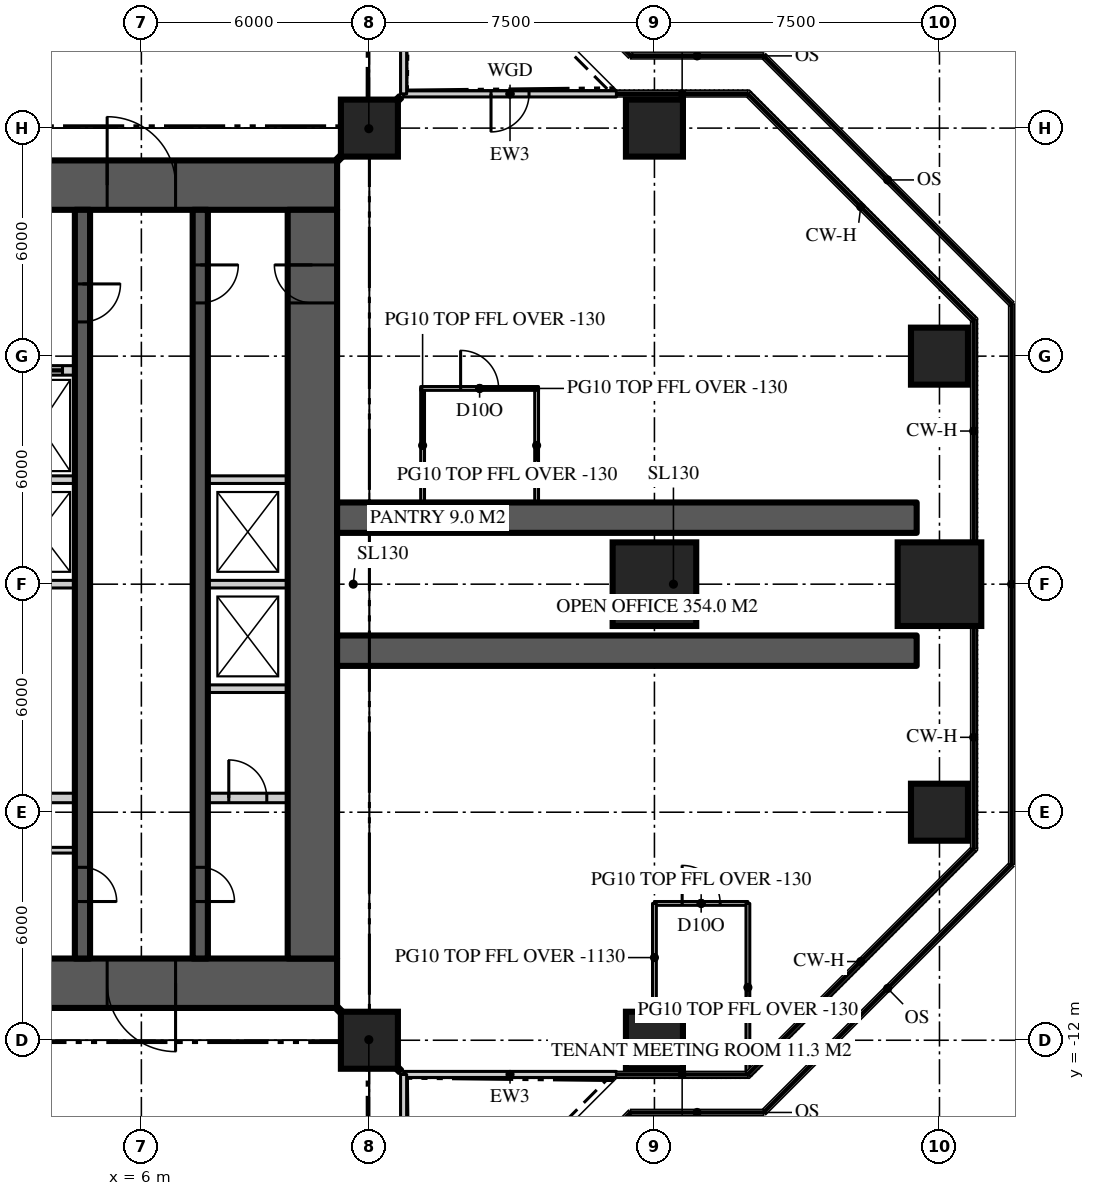
"""IFC4 building model, lengths in metres.
Left out: names, types, materials, properties, quantities, classifications, styles, units other than length and angle.
Written with IfcOpenShell. Run it as: python <this file> out.ifc"""

import sys

from ifc_helpers import new_model, si_unit, direction, frame, frame_2d, origin, origin_2d, place, context, subcontext, project, spatial, rectangle, extrude, element, fill, save


model = new_model("IFC4")
c1 = context("Model", 3, precision=1e-05, world=origin(), true_north=direction((0.0, 1.0)))
c2 = subcontext(c1, "Body", "Model", "MODEL_VIEW")
j1 = project(units=[si_unit("LENGTHUNIT", "METRE"), si_unit("PLANEANGLEUNIT", "RADIAN")], contexts=[c1])
p1 = place(None, origin())
s1 = spatial("IfcSite", under=j1, at=p1, CompositionType="ELEMENT")
p2 = place(p1, origin())
s2 = spatial("IfcBuilding", under=s1, at=p2, CompositionType="ELEMENT")
p3 = place(p2, frame((0.0, 0.0, 259.5)))
s3 = spatial("IfcBuildingStorey", under=s2, at=p3, CompositionType="ELEMENT", Elevation=259.5)
p4 = place(p3, frame((-11.15, 10.5, 0.0), z_axis=(0.0, 0.0, 1.0), x_axis=(1.0, 0.0, 0.0)))
e1 = element("IfcWall", 1, at=p4, inside=s3, PredefinedType="SHEAR", context=c2, shape_type="SweptSolid", body=[
    extrude(rectangle(XDim=22.3, YDim=1.3, at=frame_2d((11.15, 0.0))), origin(), (0.0, 0.0, 1.0), 3.9),
])
p5 = place(p4, frame((4.25, 0.0, 0.0)))
e2 = element("IfcOpeningElement", 2, at=p5, cuts=e1, PredefinedType="OPENING", context=c2, shape_type="SweptSolid", body=[
    extrude(rectangle(XDim=1.8, YDim=2.2, at=frame_2d((0.9, 1.1))), frame((0.0, 0.66, 0.0), z_axis=(0.0, -1.0, 0.0), x_axis=(1.0, 0.0, 0.0)), (0.0, 0.0, 1.0), 1.32),
])
p6 = place(p4, frame((16.25, 0.0, 0.0)))
e3 = element("IfcOpeningElement", 3, at=p6, cuts=e1, PredefinedType="OPENING", context=c2, shape_type="SweptSolid", body=[
    extrude(rectangle(XDim=1.8, YDim=2.2, at=frame_2d((0.9, 1.1))), frame((0.0, 0.66, 0.0), z_axis=(0.0, -1.0, 0.0), x_axis=(1.0, 0.0, 0.0)), (0.0, 0.0, 1.0), 1.32),
])
p7 = place(p3, frame((11.15, -10.5, 0.0), z_axis=(0.0, 0.0, 1.0), x_axis=(-1.0, 0.0, 0.0)))
e4 = element("IfcWall", 4, at=p7, inside=s3, PredefinedType="SHEAR", context=c2, shape_type="SweptSolid", body=[
    extrude(rectangle(XDim=22.3, YDim=1.3, at=frame_2d((11.15, 0.0))), origin(), (0.0, 0.0, 1.0), 3.9),
])
p8 = place(p7, frame((16.25, 0.0, 0.0)))
e5 = element("IfcOpeningElement", 5, at=p8, cuts=e4, PredefinedType="OPENING", context=c2, shape_type="SweptSolid", body=[
    extrude(rectangle(XDim=1.8, YDim=2.2, at=frame_2d((0.9, 1.1))), frame((0.0, 0.66, 0.0), z_axis=(0.0, -1.0, 0.0), x_axis=(1.0, 0.0, 0.0)), (0.0, 0.0, 1.0), 1.32),
])
p9 = place(p7, frame((4.25, 0.0, 0.0)))
e6 = element("IfcOpeningElement", 6, at=p9, cuts=e4, PredefinedType="OPENING", context=c2, shape_type="SweptSolid", body=[
    extrude(rectangle(XDim=1.8, YDim=2.2, at=frame_2d((0.9, 1.1))), frame((0.0, 0.66, 0.0), z_axis=(0.0, -1.0, 0.0), x_axis=(1.0, 0.0, 0.0)), (0.0, 0.0, 1.0), 1.32),
])
p10 = place(p3, frame((10.5, -9.85, 0.0), z_axis=(0.0, 0.0, 1.0), x_axis=(0.0, 1.0, 0.0)))
e7 = element("IfcWall", 7, at=p10, inside=s3, PredefinedType="SHEAR", context=c2, shape_type="SweptSolid", body=[
    extrude(rectangle(XDim=19.7, YDim=1.3, at=frame_2d((9.85, 0.0))), origin(), (0.0, 0.0, 1.0), 3.9),
])
p11 = place(p10, frame((17.25, 0.0, 0.0)))
e8 = element("IfcOpeningElement", 8, at=p11, cuts=e7, PredefinedType="OPENING", context=c2, shape_type="SweptSolid", body=[
    extrude(rectangle(XDim=1.0, YDim=2.2, at=frame_2d((0.5, 1.1))), frame((0.0, 0.66, 0.0), z_axis=(0.0, -1.0, 0.0), x_axis=(1.0, 0.0, 0.0)), (0.0, 0.0, 1.0), 1.32),
])
for number, where, z_axis, x_axis in (
    (9, (11.15, -1.75, 0.0), (0.0, 0.0, 1.0), (1.0, 0.0, 0.0)),
    (10, (11.15, 1.75, 0.0), (0.0, 0.0, 1.0), (1.0, 0.0, 0.0)),
):
    element("IfcWall", number, at=place(p3, frame(where, z_axis=z_axis, x_axis=x_axis)), inside=s3, PredefinedType="SHEAR", context=c2, shape_type="SweptSolid", body=[
        extrude(rectangle(XDim=15.25, YDim=0.8, at=frame_2d((7.625, 0.0))), origin(), (0.0, 0.0, 1.0), 3.9),
    ])
for number, where, z_axis, x_axis in (
    (11, (12.0, -12.0, 0.0), (0.0, 0.0, 1.0), (1.0, 0.0, 0.0)),
    (12, (19.5, -12.0, 0.0), (0.0, 0.0, 1.0), (1.0, 0.0, 0.0)),
    (13, (27.0, -6.0, 0.0), (0.0, 0.0, 1.0), (1.0, 0.0, 0.0)),
):
    element("IfcColumn", number, at=place(p3, frame(where, z_axis=z_axis, x_axis=x_axis)), inside=s3, PredefinedType="COLUMN", context=c2, shape_type="SweptSolid", body=[
        extrude(rectangle(XDim=1.5, YDim=1.5, at=origin_2d()), origin(), (0.0, 0.0, 1.0), 3.9),
    ])
for number, where, z_axis, x_axis in (
    (14, (19.5, 0.0, 0.0), (0.0, 0.0, 1.0), (1.0, 0.0, 0.0)),
    (15, (27.0, 0.0, 0.0), (0.0, 0.0, 1.0), (1.0, 0.0, 0.0)),
):
    element("IfcColumn", number, at=place(p3, frame(where, z_axis=z_axis, x_axis=x_axis)), inside=s3, PredefinedType="COLUMN", context=c2, shape_type="SweptSolid", body=[
        extrude(rectangle(XDim=2.2, YDim=2.2, at=origin_2d()), origin(), (0.0, 0.0, 1.0), 3.9),
    ])
for number, where, z_axis, x_axis in (
    (16, (27.0, 6.0, 0.0), (0.0, 0.0, 1.0), (1.0, 0.0, 0.0)),
    (17, (12.0, 12.0, 0.0), (0.0, 0.0, 1.0), (1.0, 0.0, 0.0)),
    (18, (19.5, 12.0, 0.0), (0.0, 0.0, 1.0), (1.0, 0.0, 0.0)),
):
    element("IfcColumn", number, at=place(p3, frame(where, z_axis=z_axis, x_axis=x_axis)), inside=s3, PredefinedType="COLUMN", context=c2, shape_type="SweptSolid", body=[
        extrude(rectangle(XDim=1.5, YDim=1.5, at=origin_2d()), origin(), (0.0, 0.0, 1.0), 3.9),
    ])
p12 = place(p3, frame((12.9, -12.9, 0.0), z_axis=(0.0, 0.0, 1.0), x_axis=(1.0, 0.0, 0.0)))
e19 = element("IfcWall", 19, at=p12, inside=s3, PredefinedType="SOLIDWALL", context=c2, shape_type="SweptSolid", body=[
    extrude(rectangle(XDim=5.6, YDim=0.16, at=frame_2d((2.8, 0.0))), origin(), (0.0, 0.0, 1.0), 3.77),
])
p13 = place(p3, frame((18.5, 12.9, 0.0), z_axis=(0.0, 0.0, 1.0), x_axis=(-1.0, 0.0, 0.0)))
e20 = element("IfcWall", 20, at=p13, inside=s3, PredefinedType="SOLIDWALL", context=c2, shape_type="SweptSolid", body=[
    extrude(rectangle(XDim=5.6, YDim=0.16, at=frame_2d((2.8, 0.0))), origin(), (0.0, 0.0, 1.0), 3.77),
])
p14 = place(p13, frame((2.3, 0.0, 0.0)))
e21 = element("IfcOpeningElement", 21, at=p14, cuts=e20, PredefinedType="OPENING", context=c2, shape_type="SweptSolid", body=[
    extrude(rectangle(XDim=1.0, YDim=2.2, at=frame_2d((0.5, 1.1))), frame((0.0, 0.09, 0.0), z_axis=(0.0, -1.0, 0.0), x_axis=(1.0, 0.0, 0.0)), (0.0, 0.0, 1.0), 0.18),
])
p15 = place(p3, frame((12.9, 12.9, 0.0), z_axis=(0.0, 0.0, 1.0), x_axis=(0.0, 1.0, 0.0)))
e22 = element("IfcWall", 22, at=p15, inside=s3, PredefinedType="SOLIDWALL", context=c2, shape_type="SweptSolid", body=[
    extrude(rectangle(XDim=5.6, YDim=0.16, at=frame_2d((2.8, 0.0))), origin(), (0.0, 0.0, 1.0), 3.77),
])
p16 = place(p3, frame((12.9, -18.5, 0.0), z_axis=(0.0, 0.0, 1.0), x_axis=(0.0, 1.0, 0.0)))
e23 = element("IfcWall", 23, at=p16, inside=s3, PredefinedType="SOLIDWALL", context=c2, shape_type="SweptSolid", body=[
    extrude(rectangle(XDim=5.6, YDim=0.16, at=frame_2d((2.8, 0.0))), origin(), (0.0, 0.0, 1.0), 3.77),
])
p17 = place(p16, frame((2.3, 0.0, 0.0)))
e24 = element("IfcOpeningElement", 24, at=p17, cuts=e23, PredefinedType="OPENING", context=c2, shape_type="SweptSolid", body=[
    extrude(rectangle(XDim=1.0, YDim=2.2, at=frame_2d((0.5, 1.1))), frame((0.0, 0.09, 0.0), z_axis=(0.0, -1.0, 0.0), x_axis=(1.0, 0.0, 0.0)), (0.0, 0.0, 1.0), 0.18),
])
p18 = place(p3, frame((7.55, 9.85, 0.0), z_axis=(0.0, 0.0, 1.0), x_axis=(0.0, -1.0, 0.0)))
e25 = element("IfcWall", 25, at=p18, inside=s3, PredefinedType="SHEAR", context=c2, shape_type="SweptSolid", body=[
    extrude(rectangle(XDim=19.7, YDim=0.4, at=frame_2d((9.85, 0.0))), origin(), (0.0, 0.0, 1.0), 3.9),
])
p19 = place(p18, frame((1.45, 0.0, 0.0)))
e26 = element("IfcOpeningElement", 26, at=p19, cuts=e25, PredefinedType="OPENING", context=c2, shape_type="SweptSolid", body=[
    extrude(rectangle(XDim=1.0, YDim=2.2, at=frame_2d((0.5, 1.1))), frame((0.0, 0.21, 0.0), z_axis=(0.0, -1.0, 0.0), x_axis=(1.0, 0.0, 0.0)), (0.0, 0.0, 1.0), 0.42),
])
p20 = place(p18, frame((17.3, 0.0, 0.0)))
e27 = element("IfcOpeningElement", 27, at=p20, cuts=e25, PredefinedType="OPENING", context=c2, shape_type="SweptSolid", body=[
    extrude(rectangle(XDim=0.9, YDim=2.1, at=frame_2d((0.45, 1.05))), frame((0.0, 0.21, 0.0), z_axis=(0.0, -1.0, 0.0), x_axis=(1.0, 0.0, 0.0)), (0.0, 0.0, 1.0), 0.42),
])
p21 = place(p3, frame((4.45, 9.85, 0.0), z_axis=(0.0, 0.0, 1.0), x_axis=(0.0, -1.0, 0.0)))
e28 = element("IfcWall", 28, at=p21, inside=s3, PredefinedType="SHEAR", context=c2, shape_type="SweptSolid", body=[
    extrude(rectangle(XDim=19.7, YDim=0.4, at=frame_2d((9.85, 0.0))), origin(), (0.0, 0.0, 1.0), 3.9),
])
p22 = place(p21, frame((1.95, 0.0, 0.0)))
e29 = element("IfcOpeningElement", 29, at=p22, cuts=e28, PredefinedType="OPENING", context=c2, shape_type="SweptSolid", body=[
    extrude(rectangle(XDim=1.0, YDim=2.2, at=frame_2d((0.5, 1.1))), frame((0.0, 0.21, 0.0), z_axis=(0.0, -1.0, 0.0), x_axis=(1.0, 0.0, 0.0)), (0.0, 0.0, 1.0), 0.42),
])
p23 = place(p21, frame((17.3, 0.0, 0.0)))
e30 = element("IfcOpeningElement", 30, at=p23, cuts=e28, PredefinedType="OPENING", context=c2, shape_type="SweptSolid", body=[
    extrude(rectangle(XDim=0.9, YDim=2.1, at=frame_2d((0.45, 1.05))), frame((0.0, 0.21, 0.0), z_axis=(0.0, -1.0, 0.0), x_axis=(1.0, 0.0, 0.0)), (0.0, 0.0, 1.0), 0.42),
])
p24 = place(p3, frame((2.4, 5.625, 0.0), z_axis=(0.0, 0.0, 1.0), x_axis=(1.0, 0.0, 0.0)))
e31 = element("IfcWall", 31, at=p24, inside=s3, PredefinedType="SOLIDWALL", context=c2, shape_type="SweptSolid", body=[
    extrude(rectangle(XDim=1.85, YDim=0.25, at=frame_2d((0.925, 0.0))), origin(), (0.0, 0.0, 1.0), 3.7),
])
p25 = place(p24, frame((0.325, 0.0, 0.0)))
e32 = element("IfcOpeningElement", 32, at=p25, cuts=e31, PredefinedType="OPENING", context=c2, shape_type="SweptSolid", body=[
    extrude(rectangle(XDim=1.2, YDim=2.2, at=frame_2d((0.6, 1.1))), frame((0.0, 0.135, 0.0), z_axis=(0.0, -1.0, 0.0), x_axis=(1.0, 0.0, 0.0)), (0.0, 0.0, 1.0), 0.27),
])
p26 = place(p3, frame((2.4, -5.625, 0.0), z_axis=(0.0, 0.0, 1.0), x_axis=(1.0, 0.0, 0.0)))
e33 = element("IfcWall", 33, at=p26, inside=s3, PredefinedType="SOLIDWALL", context=c2, shape_type="SweptSolid", body=[
    extrude(rectangle(XDim=1.85, YDim=0.25, at=frame_2d((0.925, 0.0))), origin(), (0.0, 0.0, 1.0), 3.7),
])
p27 = place(p3, frame((7.75, -5.625, 0.0), z_axis=(0.0, 0.0, 1.0), x_axis=(1.0, 0.0, 0.0)))
e34 = element("IfcWall", 34, at=p27, inside=s3, PredefinedType="SOLIDWALL", context=c2, shape_type="SweptSolid", body=[
    extrude(rectangle(XDim=2.1, YDim=0.25, at=frame_2d((1.05, 0.0))), origin(), (0.0, 0.0, 1.0), 3.7),
])
p28 = place(p27, frame((0.55, 0.0, 0.0)))
e35 = element("IfcOpeningElement", 35, at=p28, cuts=e34, PredefinedType="OPENING", context=c2, shape_type="SweptSolid", body=[
    extrude(rectangle(XDim=1.0, YDim=2.2, at=frame_2d((0.5, 1.1))), frame((0.0, 0.135, 0.0), z_axis=(0.0, -1.0, 0.0), x_axis=(1.0, 0.0, 0.0)), (0.0, 0.0, 1.0), 0.27),
])
p29 = place(p3, frame((7.75, -2.75, 0.0), z_axis=(0.0, 0.0, 1.0), x_axis=(1.0, 0.0, 0.0)))
e36 = element("IfcWall", 36, at=p29, inside=s3, PredefinedType="SOLIDWALL", context=c2, shape_type="SweptSolid", body=[
    extrude(rectangle(XDim=2.1, YDim=0.2, at=frame_2d((1.05, 0.0))), origin(), (0.0, 0.0, 1.0), 3.7),
])
p30 = place(p3, frame((2.4, 0.0, 0.0), z_axis=(0.0, 0.0, 1.0), x_axis=(1.0, 0.0, 0.0)))
e37 = element("IfcWall", 37, at=p30, inside=s3, PredefinedType="SOLIDWALL", context=c2, shape_type="SweptSolid", body=[
    extrude(rectangle(XDim=1.85, YDim=0.2, at=frame_2d((0.925, 0.0))), origin(), (0.0, 0.0, 1.0), 3.7),
])
p31 = place(p3, frame((7.75, 0.0, 0.0), z_axis=(0.0, 0.0, 1.0), x_axis=(1.0, 0.0, 0.0)))
e38 = element("IfcWall", 38, at=p31, inside=s3, PredefinedType="SOLIDWALL", context=c2, shape_type="SweptSolid", body=[
    extrude(rectangle(XDim=2.1, YDim=0.2, at=frame_2d((1.05, 0.0))), origin(), (0.0, 0.0, 1.0), 3.7),
])
p32 = place(p3, frame((2.4, 2.75, 0.0), z_axis=(0.0, 0.0, 1.0), x_axis=(1.0, 0.0, 0.0)))
e39 = element("IfcWall", 39, at=p32, inside=s3, PredefinedType="SOLIDWALL", context=c2, shape_type="SweptSolid", body=[
    extrude(rectangle(XDim=1.85, YDim=0.2, at=frame_2d((0.925, 0.0))), origin(), (0.0, 0.0, 1.0), 3.7),
])
p33 = place(p3, frame((7.75, 2.75, 0.0), z_axis=(0.0, 0.0, 1.0), x_axis=(1.0, 0.0, 0.0)))
e40 = element("IfcWall", 40, at=p33, inside=s3, PredefinedType="SOLIDWALL", context=c2, shape_type="SweptSolid", body=[
    extrude(rectangle(XDim=2.1, YDim=0.2, at=frame_2d((1.05, 0.0))), origin(), (0.0, 0.0, 1.0), 3.7),
])
p34 = place(p3, frame((19.5, -8.4, 0.0), z_axis=(0.0, 0.0, 1.0), x_axis=(1.0, 0.0, 0.0)))
e41 = element("IfcWall", 41, at=p34, inside=s3, PredefinedType="PARTITIONING", context=c2, shape_type="SweptSolid", body=[
    extrude(rectangle(XDim=2.459, YDim=0.1, at=frame_2d((1.229, 0.0))), origin(), (0.0, 0.0, 1.0), 3.77),
])
p35 = place(p34, frame((0.729, 0.0, 0.0)))
e42 = element("IfcOpeningElement", 42, at=p35, cuts=e41, PredefinedType="OPENING", context=c2, shape_type="SweptSolid", body=[
    extrude(rectangle(XDim=1.0, YDim=2.2, at=frame_2d((0.5, 1.1))), frame((0.0, 0.06, 0.0), z_axis=(0.0, -1.0, 0.0), x_axis=(1.0, 0.0, 0.0)), (0.0, 0.0, 1.0), 0.12),
])
p36 = place(p3, frame((19.5, -8.4, 0.0), z_axis=(0.0, 0.0, 1.0), x_axis=(0.0, -1.0, 0.0)))
e43 = element("IfcWall", 43, at=p36, inside=s3, PredefinedType="PARTITIONING", context=c2, shape_type="SweptSolid", body=[
    extrude(rectangle(XDim=2.85, YDim=0.1, at=frame_2d((1.425, 0.0))), origin(), (0.0, 0.0, 1.0), 2.77),
])
p37 = place(p3, frame((21.959, -8.4, 0.0), z_axis=(0.0, 0.0, 1.0), x_axis=(0.0, -1.0, 0.0)))
e44 = element("IfcWall", 44, at=p37, inside=s3, PredefinedType="PARTITIONING", context=c2, shape_type="SweptSolid", body=[
    extrude(rectangle(XDim=4.42, YDim=0.1, at=frame_2d((2.21, 0.0))), origin(), (0.0, 0.0, 1.0), 3.77),
])
for number, where, z_axis, x_axis in (
    (45, (13.4, 2.15, 0.0), (0.0, 0.0, 1.0), (0.0, 1.0, 0.0)),
    (46, (16.4, 2.15, 0.0), (0.0, 0.0, 1.0), (0.0, 1.0, 0.0)),
):
    element("IfcWall", number, at=place(p3, frame(where, z_axis=z_axis, x_axis=x_axis)), inside=s3, PredefinedType="PARTITIONING", context=c2, shape_type="SweptSolid", body=[
        extrude(rectangle(XDim=3.0, YDim=0.1, at=frame_2d((1.5, 0.0))), origin(), (0.0, 0.0, 1.0), 3.77),
    ])
p38 = place(p3, frame((13.35, 5.15, 0.0), z_axis=(0.0, 0.0, 1.0), x_axis=(1.0, 0.0, 0.0)))
e47 = element("IfcWall", 47, at=p38, inside=s3, PredefinedType="PARTITIONING", context=c2, shape_type="SweptSolid", body=[
    extrude(rectangle(XDim=3.1, YDim=0.1, at=frame_2d((1.55, 0.0))), origin(), (0.0, 0.0, 1.0), 3.77),
])
p39 = place(p38, frame((1.05, 0.0, 0.0)))
e48 = element("IfcOpeningElement", 48, at=p39, cuts=e47, PredefinedType="OPENING", context=c2, shape_type="SweptSolid", body=[
    extrude(rectangle(XDim=1.0, YDim=2.2, at=frame_2d((0.5, 1.1))), frame((0.0, 0.06, 0.0), z_axis=(0.0, -1.0, 0.0), x_axis=(1.0, 0.0, 0.0)), (0.0, 0.0, 1.0), 0.12),
])
for number, where, z_axis, x_axis in (
    (49, (11.15, 11.15, 0.0), (0.0, 0.0, 1.0), (0.707, 0.707, 0.0)),
    (50, (11.15, -11.15, 0.0), (0.0, 0.0, 1.0), (0.707, -0.707, 0.0)),
):
    element("IfcWall", number, at=place(p3, frame(where, z_axis=z_axis, x_axis=x_axis)), inside=s3, PredefinedType="PARTITIONING", context=c2, shape_type="SweptSolid", body=[
        extrude(rectangle(XDim=2.362, YDim=0.15, at=frame_2d((1.181, 0.0))), origin(), (0.0, 0.0, 1.0), 3.22),
    ])
p40 = place(p3, frame((2.4, -7.0, 0.0), z_axis=(0.0, 0.0, 1.0), x_axis=(1.0, 0.0, 0.0)))
e51 = element("IfcWall", 51, at=p40, inside=s3, PredefinedType="SOLIDWALL", context=c2, shape_type="SweptSolid", body=[
    extrude(rectangle(XDim=1.85, YDim=0.15, at=frame_2d((0.925, 0.0))), origin(), (0.0, 0.0, 1.0), 3.77),
])
p41 = place(p40, frame((0.1, 0.0, 0.0)))
e52 = element("IfcOpeningElement", 52, at=p41, cuts=e51, PredefinedType="OPENING", context=c2, shape_type="SweptSolid", body=[
    extrude(rectangle(XDim=0.9, YDim=2.1, at=frame_2d((0.45, 1.05))), frame((0.0, 0.085, 0.0), z_axis=(0.0, -1.0, 0.0), x_axis=(1.0, 0.0, 0.0)), (0.0, 0.0, 1.0), 0.17),
])
p42 = place(p14, origin())
e53 = element("IfcDoor", 53, at=p42, inside=s3, OperationType="SINGLE_SWING_RIGHT", PredefinedType="DOOR", context=c2, shape_type="SweptSolid", body=[
    extrude(rectangle(XDim=1.0, YDim=2.2, at=frame_2d((0.5, 1.1))), frame((0.0, 0.025, 0.0), z_axis=(0.0, -1.0, 0.0), x_axis=(1.0, 0.0, 0.0)), (0.0, 0.0, 1.0), 0.05),
])
fill(e21, e53)
p43 = place(p6, origin())
e54 = element("IfcDoor", 54, at=p43, inside=s3, OperationType="DOUBLE_DOOR_DOUBLE_SWING", PredefinedType="DOOR", context=c2, shape_type="SweptSolid", body=[
    extrude(rectangle(XDim=1.8, YDim=2.2, at=frame_2d((0.9, 1.1))), frame((0.0, 0.025, 0.0), z_axis=(0.0, -1.0, 0.0), x_axis=(1.0, 0.0, 0.0)), (0.0, 0.0, 1.0), 0.05),
])
fill(e3, e54)
p44 = place(p9, origin())
e55 = element("IfcDoor", 55, at=p44, inside=s3, OperationType="DOUBLE_DOOR_DOUBLE_SWING", PredefinedType="DOOR", context=c2, shape_type="SweptSolid", body=[
    extrude(rectangle(XDim=1.8, YDim=2.2, at=frame_2d((0.9, 1.1))), frame((0.0, 0.025, 0.0), z_axis=(0.0, -1.0, 0.0), x_axis=(1.0, 0.0, 0.0)), (0.0, 0.0, 1.0), 0.05),
])
fill(e6, e55)
p45 = place(p19, origin())
e56 = element("IfcDoor", 56, at=p45, inside=s3, OperationType="SINGLE_SWING_LEFT", PredefinedType="DOOR", context=c2, shape_type="SweptSolid", body=[
    extrude(rectangle(XDim=1.0, YDim=2.2, at=frame_2d((0.5, 1.1))), frame((0.0, 0.025, 0.0), z_axis=(0.0, -1.0, 0.0), x_axis=(1.0, 0.0, 0.0)), (0.0, 0.0, 1.0), 0.05),
])
fill(e26, e56)
p46 = place(p11, origin())
e57 = element("IfcDoor", 57, at=p46, inside=s3, OperationType="SINGLE_SWING_RIGHT", PredefinedType="DOOR", context=c2, shape_type="SweptSolid", body=[
    extrude(rectangle(XDim=1.0, YDim=2.2, at=frame_2d((0.5, 1.1))), frame((0.0, 0.025, 0.0), z_axis=(0.0, -1.0, 0.0), x_axis=(1.0, 0.0, 0.0)), (0.0, 0.0, 1.0), 0.05),
])
fill(e8, e57)
p47 = place(p22, origin())
e58 = element("IfcDoor", 58, at=p47, inside=s3, OperationType="SINGLE_SWING_LEFT", PredefinedType="DOOR", context=c2, shape_type="SweptSolid", body=[
    extrude(rectangle(XDim=1.0, YDim=2.2, at=frame_2d((0.5, 1.1))), frame((0.0, 0.025, 0.0), z_axis=(0.0, -1.0, 0.0), x_axis=(1.0, 0.0, 0.0)), (0.0, 0.0, 1.0), 0.05),
])
fill(e29, e58)
p48 = place(p20, origin())
e59 = element("IfcDoor", 59, at=p48, inside=s3, OperationType="SINGLE_SWING_RIGHT", PredefinedType="DOOR", context=c2, shape_type="SweptSolid", body=[
    extrude(rectangle(XDim=0.9, YDim=2.1, at=frame_2d((0.45, 1.05))), frame((0.0, 0.025, 0.0), z_axis=(0.0, -1.0, 0.0), x_axis=(1.0, 0.0, 0.0)), (0.0, 0.0, 1.0), 0.05),
])
fill(e27, e59)
p49 = place(p23, origin())
e60 = element("IfcDoor", 60, at=p49, inside=s3, OperationType="SINGLE_SWING_RIGHT", PredefinedType="DOOR", context=c2, shape_type="SweptSolid", body=[
    extrude(rectangle(XDim=0.9, YDim=2.1, at=frame_2d((0.45, 1.05))), frame((0.0, 0.025, 0.0), z_axis=(0.0, -1.0, 0.0), x_axis=(1.0, 0.0, 0.0)), (0.0, 0.0, 1.0), 0.05),
])
fill(e30, e60)
p50 = place(p25, origin())
e61 = element("IfcDoor", 61, at=p50, inside=s3, OperationType="SLIDING_TO_LEFT", PredefinedType="DOOR", context=c2, shape_type="SweptSolid", body=[
    extrude(rectangle(XDim=1.2, YDim=2.2, at=frame_2d((0.6, 1.1))), frame((0.0, 0.025, 0.0), z_axis=(0.0, -1.0, 0.0), x_axis=(1.0, 0.0, 0.0)), (0.0, 0.0, 1.0), 0.05),
])
fill(e32, e61)
p51 = place(p35, origin())
e62 = element("IfcDoor", 62, at=p51, inside=s3, OperationType="SINGLE_SWING_LEFT", PredefinedType="DOOR", context=c2, shape_type="SweptSolid", body=[
    extrude(rectangle(XDim=1.0, YDim=2.2, at=frame_2d((0.5, 1.1))), frame((0.0, 0.025, 0.0), z_axis=(0.0, -1.0, 0.0), x_axis=(1.0, 0.0, 0.0)), (0.0, 0.0, 1.0), 0.05),
])
fill(e42, e62)
p52 = place(p39, origin())
e63 = element("IfcDoor", 63, at=p52, inside=s3, OperationType="SINGLE_SWING_LEFT", PredefinedType="DOOR", context=c2, shape_type="SweptSolid", body=[
    extrude(rectangle(XDim=1.0, YDim=2.2, at=frame_2d((0.5, 1.1))), frame((0.0, 0.025, 0.0), z_axis=(0.0, -1.0, 0.0), x_axis=(1.0, 0.0, 0.0)), (0.0, 0.0, 1.0), 0.05),
])
fill(e48, e63)
p53 = place(p28, origin())
e64 = element("IfcDoor", 64, at=p53, inside=s3, OperationType="SINGLE_SWING_LEFT", PredefinedType="DOOR", context=c2, shape_type="SweptSolid", body=[
    extrude(rectangle(XDim=1.0, YDim=2.2, at=frame_2d((0.5, 1.1))), frame((0.0, 0.025, 0.0), z_axis=(0.0, -1.0, 0.0), x_axis=(1.0, 0.0, 0.0)), (0.0, 0.0, 1.0), 0.05),
])
fill(e35, e64)
save(model, sys.argv[1])
